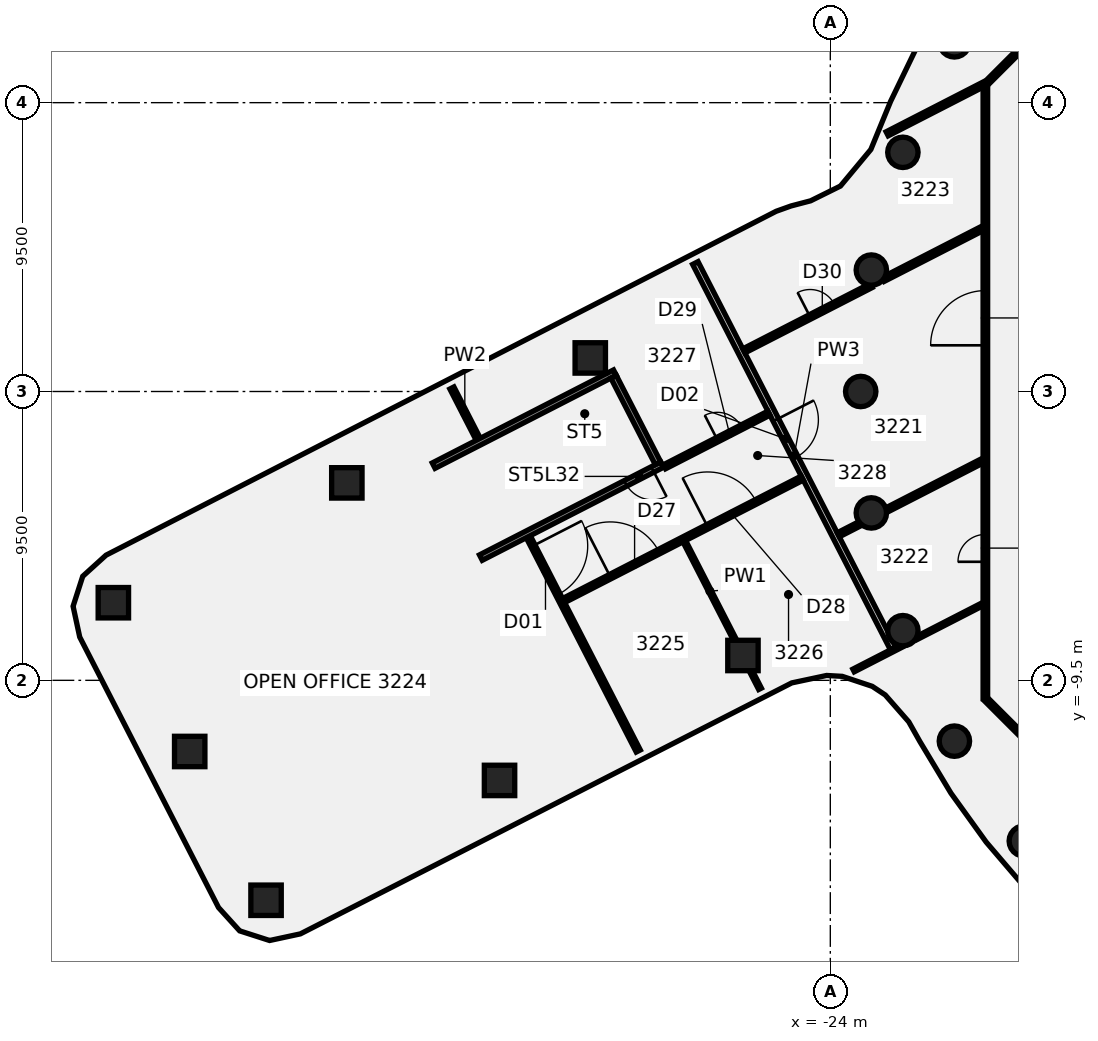
"""IFC4 building model, lengths in metres.
Left out: names, types, materials, properties, quantities, classifications, styles, units other than length and angle.
Written with IfcOpenShell. Run it as: python <this file> out.ifc"""

import sys

from ifc_helpers import new_model, si_unit, direction, frame, frame_2d, origin, origin_2d, place, context, subcontext, project, spatial, polyline, rectangle, circle, outline, extrude, element, fill, save


model = new_model("IFC4")
c1 = context("Model", 3, precision=1e-05, world=origin(), true_north=direction((0.0, 1.0)))
c2 = subcontext(c1, "Body", "Model", "MODEL_VIEW")
j1 = project(units=[si_unit("LENGTHUNIT", "METRE"), si_unit("PLANEANGLEUNIT", "RADIAN")], contexts=[c1])
p1 = place(None, origin())
s1 = spatial("IfcSite", under=j1, at=p1, CompositionType="ELEMENT")
p2 = place(p1, origin())
s2 = spatial("IfcBuilding", under=s1, at=p2, CompositionType="ELEMENT")
p3 = place(p2, frame((0.0, 0.0, 133.0)))
s3 = spatial("IfcBuildingStorey", under=s2, at=p3, CompositionType="ELEMENT", Elevation=133.0)
for number, where, z_axis, x_axis in (
    (1, (-19.919, 11.5, -0.14), (0.0, 0.0, 1.0), (1.0, 0.0, 0.0)),
    (2, (-21.613, 7.866, -0.14), (0.0, 0.0, 1.0), (1.0, 0.0, 0.0)),
    (3, (-22.651, 3.994, -0.14), (0.0, 0.0, 1.0), (1.0, 0.0, 0.0)),
    (4, (-23.0, 0.0, -0.14), (0.0, 0.0, 1.0), (1.0, 0.0, 0.0)),
    (5, (-22.651, -3.994, -0.14), (0.0, 0.0, 1.0), (1.0, 0.0, 0.0)),
    (6, (-21.613, -7.866, -0.14), (0.0, 0.0, 1.0), (1.0, 0.0, 0.0)),
    (7, (-19.919, -11.5, -0.14), (0.0, 0.0, 1.0), (1.0, 0.0, 0.0)),
    (8, (-17.619, -14.784, -0.14), (0.0, 0.0, 1.0), (1.0, 0.0, 0.0)),
):
    element("IfcColumn", number, at=place(p3, frame(where, z_axis=z_axis, x_axis=x_axis)), inside=s3, PredefinedType="COLUMN", context=c2, shape_type="SweptSolid", body=[
        extrude(circle(Radius=0.5, at=origin_2d()), origin(), (0.0, 0.0, 1.0), 3.75),
    ])
p4 = place(p3, frame((-34.88, -12.792, -0.134), z_axis=(0.062521773916, -0.061871859426, 0.996123938472), x_axis=(-0.453556116001, 0.887299968667, 0.083579993069)))
e9 = element("IfcColumn", 9, at=p4, inside=s3, PredefinedType="COLUMN", context=c2, shape_type="SweptSolid", body=[
    extrude(rectangle(XDim=1.0, YDim=1.0, at=origin_2d()), origin(), (0.0, 0.0, 1.0), 3.757),
])
p5 = place(p3, frame((-39.903, -3.006, -0.134), z_axis=(0.015336055459, -0.086557736741, 0.996128788668), x_axis=(0.889923738813, 0.455375187571, 0.025868468099)))
e10 = element("IfcColumn", 10, at=p5, inside=s3, PredefinedType="COLUMN", context=c2, shape_type="SweptSolid", body=[
    extrude(rectangle(XDim=1.0, YDim=1.0, at=origin_2d()), origin(), (0.0, 0.0, 1.0), 3.757),
])
p6 = place(p3, frame((-26.873, -8.683, -0.136), z_axis=(0.042396721911, -0.023249815242, 0.99883029793), x_axis=(-0.45636204272, 0.888891864763, 0.040061686479)))
e11 = element("IfcColumn", 11, at=p6, inside=s3, PredefinedType="COLUMN", context=c2, shape_type="SweptSolid", body=[
    extrude(rectangle(XDim=1.0, YDim=1.0, at=origin_2d()), origin(), (0.0, 0.0, 1.0), 3.749),
])
p7 = place(p3, frame((-31.896, 1.104, -0.136), z_axis=(-0.004949211766, -0.048124572307, 0.998829079895), x_axis=(0.889858610868, 0.455474581289, 0.026354477116)))
e12 = element("IfcColumn", 12, at=p7, inside=s3, PredefinedType="COLUMN", context=c2, shape_type="SweptSolid", body=[
    extrude(rectangle(XDim=1.0, YDim=1.0, at=origin_2d()), origin(), (0.0, 0.0, 1.0), 3.749),
])
p8 = place(p3, frame((-47.583, -6.947, -0.131), z_axis=(0.021573490305, -0.130025765362, 0.991275887358), x_axis=(0.890036848371, 0.454113091891, 0.04019587435)))
e13 = element("IfcColumn", 13, at=p8, inside=s3, PredefinedType="COLUMN", context=c2, shape_type="SweptSolid", body=[
    extrude(rectangle(XDim=1.0, YDim=1.0, at=origin_2d()), origin(), (0.0, 0.0, 1.0), 3.757),
])
p9 = place(p3, frame((-45.071, -11.84, -0.133), z_axis=(0.045053158792, -0.117801332946, 0.992014646484), x_axis=(0.890031586101, 0.455693217506, 0.013691868468)))
e14 = element("IfcColumn", 14, at=p9, inside=s3, PredefinedType="COLUMN", context=c2, shape_type="SweptSolid", body=[
    extrude(rectangle(XDim=1.0, YDim=1.0, at=origin_2d()), origin(), (0.0, 0.0, 1.0), 3.755),
])
p10 = place(p3, frame((-42.56, -16.733, -0.132), z_axis=(0.068538826824, -0.105474361583, 0.992057250498), x_axis=(-0.452121084233, 0.883135905889, 0.125129920171)))
e15 = element("IfcColumn", 15, at=p10, inside=s3, PredefinedType="COLUMN", context=c2, shape_type="SweptSolid", body=[
    extrude(rectangle(XDim=1.0, YDim=1.0, at=origin_2d()), origin(), (0.0, 0.0, 1.0), 3.754),
])
p11 = place(p3, frame((-36.447, 0.116, 0.0), z_axis=(0.0, 0.0, 1.0), x_axis=(0.456697932763, -0.889621828762, 0.0)))
e16 = element("IfcWall", 16, at=p11, inside=s3, PredefinedType="PARTITIONING", context=c2, shape_type="SweptSolid", body=[
    extrude(rectangle(XDim=1.859, YDim=0.15, at=frame_2d((0.929, 0.0))), origin(), (0.0, 0.0, 1.0), 3.01),
])
p12 = place(p3, frame((-33.917, -4.812, 0.0), z_axis=(0.0, 0.0, 1.0), x_axis=(0.456714601122, -0.889613271665, 0.0)))
e17 = element("IfcWall", 17, at=p12, inside=s3, PredefinedType="PARTITIONING", context=c2, shape_type="SweptSolid", body=[
    extrude(rectangle(XDim=7.883, YDim=0.15, at=frame_2d((3.941, 0.0))), origin(), (0.0, 0.0, 1.0), 3.01),
])
p13 = place(p12, frame((0.3, 0.0, 0.0)))
e18 = element("IfcOpeningElement", 18, at=p13, cuts=e17, PredefinedType="OPENING", context=c2, shape_type="SweptSolid", body=[
    extrude(rectangle(XDim=1.8, YDim=2.1, at=frame_2d((0.9, 1.05))), frame((0.0, 0.085, 0.0), z_axis=(0.0, -1.0, 0.0), x_axis=(1.0, 0.0, 0.0)), (0.0, 0.0, 1.0), 0.17),
])
p14 = place(p3, frame((-28.803, -4.924, 0.0), z_axis=(0.0, 0.0, 1.0), x_axis=(0.456510977647, -0.889717779573, 0.0)))
e19 = element("IfcWall", 19, at=p14, inside=s3, PredefinedType="PARTITIONING", context=c2, shape_type="SweptSolid", body=[
    extrude(rectangle(XDim=3.698, YDim=0.1, at=frame_2d((1.849, 0.0))), origin(), (0.0, 0.0, 1.0), 3.01),
])
p15 = place(p3, frame((-26.57, -9.276, 0.0), z_axis=(0.0, 0.0, 1.0), x_axis=(0.456869393686, -0.889533786381, 0.0)))
e20 = element("IfcWall", 20, at=p15, inside=s3, PredefinedType="PARTITIONING", context=c2, shape_type="SweptSolid", body=[
    extrude(rectangle(XDim=0.565, YDim=0.1, at=frame_2d((0.282, 0.0))), origin(), (0.0, 0.0, 1.0), 3.01),
])
p16 = place(p3, frame((-28.439, 4.225, 0.0), z_axis=(0.0, 0.0, 1.0), x_axis=(0.456564117727, -0.889690511585, 0.0)))
e21 = element("IfcWall", 21, at=p16, inside=s3, PredefinedType="PARTITIONING", context=c2, shape_type="SweptSolid", body=[
    extrude(rectangle(XDim=14.24, YDim=0.2, at=frame_2d((7.12, 0.0))), origin(), (0.0, 0.0, 1.0), 3.01),
])
p17 = place(p16, frame((5.799, 0.0, 0.0)))
e22 = element("IfcOpeningElement", 22, at=p17, cuts=e21, PredefinedType="OPENING", context=c2, shape_type="SweptSolid", body=[
    extrude(rectangle(XDim=1.4, YDim=2.1, at=frame_2d((0.7, 1.05))), frame((0.0, 0.11, 0.0), z_axis=(0.0, -1.0, 0.0), x_axis=(1.0, 0.0, 0.0)), (0.0, 0.0, 1.0), 0.22),
])
p18 = place(p3, frame((-18.872, -10.128, 0.0), z_axis=(0.0, 0.0, 1.0), x_axis=(0.707106781187, -0.707106781187, 0.0)))
e23 = element("IfcWall", 23, at=p18, inside=s3, PredefinedType="PARTITIONING", context=c2, shape_type="SweptSolid", body=[
    extrude(rectangle(XDim=2.465, YDim=0.15, at=frame_2d((1.232, 0.0))), origin(), (0.0, 0.0, 1.0), 3.01),
])
p19 = place(p3, frame((-32.769, -6.875, 0.0), z_axis=(0.0, 0.0, 1.0), x_axis=(0.889705612148, 0.45653469059, 0.0)))
e24 = element("IfcWall", 24, at=p19, inside=s3, PredefinedType="PARTITIONING", context=c2, shape_type="SweptSolid", body=[
    extrude(rectangle(XDim=8.819, YDim=0.15, at=frame_2d((4.41, 0.0))), origin(), (0.0, 0.0, 1.0), 3.01),
])
p20 = place(p19, frame((1.72, 0.0, 0.0)))
e25 = element("IfcOpeningElement", 25, at=p20, cuts=e24, PredefinedType="OPENING", context=c2, shape_type="SweptSolid", body=[
    extrude(rectangle(XDim=1.8, YDim=2.1, at=frame_2d((0.9, 1.05))), frame((0.0, 0.085, 0.0), z_axis=(0.0, -1.0, 0.0), x_axis=(1.0, 0.0, 0.0)), (0.0, 0.0, 1.0), 0.17),
])
p21 = place(p19, frame((5.319, 0.0, 0.0)))
e26 = element("IfcOpeningElement", 26, at=p21, cuts=e24, PredefinedType="OPENING", context=c2, shape_type="SweptSolid", body=[
    extrude(rectangle(XDim=1.8, YDim=2.1, at=frame_2d((0.9, 1.05))), frame((0.0, 0.085, 0.0), z_axis=(0.0, -1.0, 0.0), x_axis=(1.0, 0.0, 0.0)), (0.0, 0.0, 1.0), 0.17),
])
p22 = place(p3, frame((-29.452, -2.475, 0.0), z_axis=(0.0, 0.0, 1.0), x_axis=(0.889671887014, 0.456600408954, 0.0)))
e27 = element("IfcWall", 27, at=p22, inside=s3, PredefinedType="PARTITIONING", context=c2, shape_type="SweptSolid", body=[
    extrude(rectangle(XDim=3.86, YDim=0.15, at=frame_2d((1.93, 0.0))), origin(), (0.0, 0.0, 1.0), 3.01),
])
p23 = place(p22, frame((1.95, 0.0, 0.0)))
e28 = element("IfcOpeningElement", 28, at=p23, cuts=e27, PredefinedType="OPENING", context=c2, shape_type="SweptSolid", body=[
    extrude(rectangle(XDim=0.9, YDim=2.1, at=frame_2d((0.45, 1.05))), frame((0.0, 0.085, 0.0), z_axis=(0.0, -1.0, 0.0), x_axis=(1.0, 0.0, 0.0)), (0.0, 0.0, 1.0), 0.17),
])
p24 = place(p3, frame((-26.844, 1.336, 0.0), z_axis=(0.0, 0.0, 1.0), x_axis=(0.889711625335, 0.456522971759, 0.0)))
e29 = element("IfcWall", 29, at=p24, inside=s3, PredefinedType="PARTITIONING", context=c2, shape_type="SweptSolid", body=[
    extrude(rectangle(XDim=4.708, YDim=0.15, at=frame_2d((2.354, 0.0))), origin(), (0.0, 0.0, 1.0), 3.01),
])
p25 = place(p24, frame((2.45, 0.0, 0.0)))
e30 = element("IfcOpeningElement", 30, at=p25, cuts=e29, PredefinedType="OPENING", context=c2, shape_type="SweptSolid", body=[
    extrude(rectangle(XDim=0.9, YDim=2.1, at=frame_2d((0.45, 1.05))), frame((0.0, 0.085, 0.0), z_axis=(0.0, -1.0, 0.0), x_axis=(1.0, 0.0, 0.0)), (0.0, 0.0, 1.0), 0.17),
])
p26 = place(p3, frame((-22.26, 3.688, 0.0), z_axis=(0.0, 0.0, 1.0), x_axis=(0.889723982038, 0.45649888914, 0.0)))
e31 = element("IfcWall", 31, at=p26, inside=s3, PredefinedType="PARTITIONING", context=c2, shape_type="SweptSolid", body=[
    extrude(rectangle(XDim=3.671, YDim=0.15, at=frame_2d((1.836, 0.0))), origin(), (0.0, 0.0, 1.0), 3.01),
])
p27 = place(p3, frame((-23.736, -4.712, 0.0), z_axis=(0.0, 0.0, 1.0), x_axis=(0.889684437698, 0.456575953503, 0.0)))
e32 = element("IfcWall", 32, at=p27, inside=s3, PredefinedType="PARTITIONING", context=c2, shape_type="SweptSolid", body=[
    extrude(rectangle(XDim=0.822, YDim=0.15, at=frame_2d((0.411, 0.0))), origin(), (0.0, 0.0, 1.0), 3.01),
])
p28 = place(p3, frame((-22.164, -3.906, 0.0), z_axis=(0.0, 0.0, 1.0), x_axis=(0.889720446933, 0.456505779054, 0.0)))
e33 = element("IfcWall", 33, at=p28, inside=s3, PredefinedType="PARTITIONING", context=c2, shape_type="SweptSolid", body=[
    extrude(rectangle(XDim=3.564, YDim=0.15, at=frame_2d((1.782, 0.0))), origin(), (0.0, 0.0, 1.0), 3.01),
])
p29 = place(p3, frame((-23.235, -9.176, 0.0), z_axis=(0.0, 0.0, 1.0), x_axis=(0.889731557273, 0.456484124578, 0.0)))
e34 = element("IfcWall", 34, at=p29, inside=s3, PredefinedType="PARTITIONING", context=c2, shape_type="SweptSolid", body=[
    extrude(rectangle(XDim=1.776, YDim=0.1, at=frame_2d((0.888, 0.0))), origin(), (0.0, 0.0, 1.0), 3.01),
])
p30 = place(p3, frame((-21.17, -8.116, 0.0), z_axis=(0.0, 0.0, 1.0), x_axis=(0.889716227949, 0.456514001675, 0.0)))
e35 = element("IfcWall", 35, at=p30, inside=s3, PredefinedType="PARTITIONING", context=c2, shape_type="SweptSolid", body=[
    extrude(rectangle(XDim=2.461, YDim=0.1, at=frame_2d((1.23, 0.0))), origin(), (0.0, 0.0, 1.0), 3.01),
])
p31 = place(p3, frame((-22.13, 8.476, 0.0), z_axis=(0.0, 0.0, 1.0), x_axis=(0.889666890189, 0.456610144984, 0.0)))
e36 = element("IfcWall", 36, at=p31, inside=s3, PredefinedType="PARTITIONING", context=c2, shape_type="SweptSolid", body=[
    extrude(rectangle(XDim=3.597, YDim=0.15, at=frame_2d((1.798, 0.0))), origin(), (0.0, 0.0, 1.0), 3.01),
])
p32 = place(p3, frame((-18.872, 10.128, 0.0), z_axis=(0.0, 0.0, 1.0), x_axis=(0.707106781187, 0.707106781187, 0.0)))
e37 = element("IfcWall", 37, at=p32, inside=s3, PredefinedType="PARTITIONING", context=c2, shape_type="SweptSolid", body=[
    extrude(rectangle(XDim=2.505, YDim=0.15, at=frame_2d((1.253, 0.0))), origin(), (0.0, 0.0, 1.0), 3.01),
])
p33 = place(p3, frame((-18.9, -10.1, 0.0), z_axis=(0.0, 0.0, 1.0), x_axis=(0.0, 1.0, 0.0)))
e38 = element("IfcWall", 38, at=p33, inside=s3, PredefinedType="PARTITIONING", context=c2, shape_type="SweptSolid", body=[
    extrude(rectangle(XDim=20.2, YDim=0.15, at=frame_2d((10.1, 0.0))), origin(), (0.0, 0.0, 1.0), 3.01),
])
p34 = place(p33, frame((11.619, 0.0, 0.0)))
e39 = element("IfcOpeningElement", 39, at=p34, cuts=e38, PredefinedType="OPENING", context=c2, shape_type="SweptSolid", body=[
    extrude(rectangle(XDim=1.8, YDim=2.1, at=frame_2d((0.9, 1.05))), frame((0.0, 0.085, 0.0), z_axis=(0.0, -1.0, 0.0), x_axis=(1.0, 0.0, 0.0)), (0.0, 0.0, 1.0), 0.17),
])
p35 = place(p33, frame((4.499, 0.0, 0.0)))
e40 = element("IfcOpeningElement", 40, at=p35, cuts=e38, PredefinedType="OPENING", context=c2, shape_type="SweptSolid", body=[
    extrude(rectangle(XDim=0.9, YDim=2.1, at=frame_2d((0.45, 1.05))), frame((0.0, 0.085, 0.0), z_axis=(0.0, -1.0, 0.0), x_axis=(1.0, 0.0, 0.0)), (0.0, 0.0, 1.0), 0.17),
])
p36 = place(p3, frame((-29.533, -2.405, -0.14), z_axis=(0.0, 0.0, 1.0), x_axis=(-0.889699446703, -0.456546705756, 0.0)))
e41 = element("IfcWall", 41, at=p36, inside=s3, PredefinedType="SHEAR", context=c2, shape_type="SweptSolid", body=[
    extrude(rectangle(XDim=6.7, YDim=0.2, at=frame_2d((3.35, 0.0))), origin(), (0.0, 0.0, 1.0), 3.15),
])
p37 = place(p36, frame((0.35, 0.0, 0.0)))
e42 = element("IfcOpeningElement", 42, at=p37, cuts=e41, PredefinedType="OPENING", context=c2, shape_type="SweptSolid", body=[
    extrude(rectangle(XDim=1.0, YDim=2.1, at=frame_2d((0.5, 1.05))), frame((0.0, 0.11, 0.0), z_axis=(0.0, -1.0, 0.0), x_axis=(1.0, 0.0, 0.0)), (0.0, 0.0, 1.0), 0.22),
])
p38 = place(p3, frame((-31.085, 0.621, -0.14), z_axis=(0.0, 0.0, 1.0), x_axis=(-0.889684645268, -0.456575549033, 0.0)))
e43 = element("IfcWall", 43, at=p38, inside=s3, PredefinedType="SHEAR", context=c2, shape_type="SweptSolid", body=[
    extrude(rectangle(XDim=6.7, YDim=0.2, at=frame_2d((3.35, 0.0))), origin(), (0.0, 0.0, 1.0), 3.15),
])
p39 = place(p3, frame((-31.129, 0.486, -0.14), z_axis=(0.0, 0.0, 1.0), x_axis=(0.456558269459, -0.889693512727, 0.0)))
e44 = element("IfcWall", 44, at=p39, inside=s3, PredefinedType="SHEAR", context=c2, shape_type="SweptSolid", body=[
    extrude(rectangle(XDim=3.2, YDim=0.2, at=frame_2d((1.6, 0.0))), origin(), (0.0, 0.0, 1.0), 3.15),
])
p40 = place(p3, frame((0.0, 0.0, -0.14)))
e45 = element("IfcWall", 45, at=p40, inside=s3, PredefinedType="SHEAR", context=c2, shape_type="SweptSolid", body=[
    extrude(outline(polyline([(-36.823, -2.436), (-37.001, -2.527), (-35.54, -5.375), (-35.362, -5.283), (-36.823, -2.436)])), origin(), (0.0, 0.0, 1.0), 3.15),
])
p41 = place(p13, frame((1.8, 0.0, 0.0), z_axis=(0.0, 0.0, 1.0), x_axis=(-1.0, 0.0, 0.0)))
e46 = element("IfcDoor", 46, at=p41, inside=s3, OperationType="DOUBLE_DOOR_SINGLE_SWING", PredefinedType="DOOR", context=c2, shape_type="SweptSolid", body=[
    extrude(rectangle(XDim=1.8, YDim=2.1, at=frame_2d((0.9, 1.05))), frame((0.0, 0.025, 0.0), z_axis=(0.0, -1.0, 0.0), x_axis=(1.0, 0.0, 0.0)), (0.0, 0.0, 1.0), 0.05),
])
fill(e18, e46)
p42 = place(p17, origin())
e47 = element("IfcDoor", 47, at=p42, inside=s3, OperationType="DOUBLE_DOOR_SINGLE_SWING", PredefinedType="DOOR", context=c2, shape_type="SweptSolid", body=[
    extrude(rectangle(XDim=1.4, YDim=2.1, at=frame_2d((0.7, 1.05))), frame((0.0, 0.025, 0.0), z_axis=(0.0, -1.0, 0.0), x_axis=(1.0, 0.0, 0.0)), (0.0, 0.0, 1.0), 0.05),
])
fill(e22, e47)
p43 = place(p20, frame((1.8, 0.0, 0.0), z_axis=(0.0, 0.0, 1.0), x_axis=(-1.0, 0.0, 0.0)))
e48 = element("IfcDoor", 48, at=p43, inside=s3, OperationType="DOUBLE_DOOR_SINGLE_SWING", PredefinedType="DOOR", context=c2, shape_type="SweptSolid", body=[
    extrude(rectangle(XDim=1.8, YDim=2.1, at=frame_2d((0.9, 1.05))), frame((0.0, 0.025, 0.0), z_axis=(0.0, -1.0, 0.0), x_axis=(1.0, 0.0, 0.0)), (0.0, 0.0, 1.0), 0.05),
])
fill(e25, e48)
p44 = place(p21, frame((1.8, 0.0, 0.0), z_axis=(0.0, 0.0, 1.0), x_axis=(-1.0, 0.0, 0.0)))
e49 = element("IfcDoor", 49, at=p44, inside=s3, OperationType="DOUBLE_DOOR_SINGLE_SWING", PredefinedType="DOOR", context=c2, shape_type="SweptSolid", body=[
    extrude(rectangle(XDim=1.8, YDim=2.1, at=frame_2d((0.9, 1.05))), frame((0.0, 0.025, 0.0), z_axis=(0.0, -1.0, 0.0), x_axis=(1.0, 0.0, 0.0)), (0.0, 0.0, 1.0), 0.05),
])
fill(e26, e49)
p45 = place(p23, origin())
e50 = element("IfcDoor", 50, at=p45, inside=s3, OperationType="SINGLE_SWING_LEFT", PredefinedType="DOOR", context=c2, shape_type="SweptSolid", body=[
    extrude(rectangle(XDim=0.9, YDim=2.1, at=frame_2d((0.45, 1.05))), frame((0.0, 0.025, 0.0), z_axis=(0.0, -1.0, 0.0), x_axis=(1.0, 0.0, 0.0)), (0.0, 0.0, 1.0), 0.05),
])
fill(e28, e50)
p46 = place(p25, origin())
e51 = element("IfcDoor", 51, at=p46, inside=s3, OperationType="SINGLE_SWING_LEFT", PredefinedType="DOOR", context=c2, shape_type="SweptSolid", body=[
    extrude(rectangle(XDim=0.9, YDim=2.1, at=frame_2d((0.45, 1.05))), frame((0.0, 0.025, 0.0), z_axis=(0.0, -1.0, 0.0), x_axis=(1.0, 0.0, 0.0)), (0.0, 0.0, 1.0), 0.05),
])
fill(e30, e51)
p47 = place(p34, frame((1.8, 0.0, 0.0), z_axis=(0.0, 0.0, 1.0), x_axis=(-1.0, 0.0, 0.0)))
e52 = element("IfcDoor", 52, at=p47, inside=s3, OperationType="DOUBLE_DOOR_SINGLE_SWING", PredefinedType="DOOR", context=c2, shape_type="SweptSolid", body=[
    extrude(rectangle(XDim=1.8, YDim=2.1, at=frame_2d((0.9, 1.05))), frame((0.0, 0.025, 0.0), z_axis=(0.0, -1.0, 0.0), x_axis=(1.0, 0.0, 0.0)), (0.0, 0.0, 1.0), 0.05),
])
fill(e39, e52)
p48 = place(p35, origin())
e53 = element("IfcDoor", 53, at=p48, inside=s3, OperationType="SINGLE_SWING_RIGHT", PredefinedType="DOOR", context=c2, shape_type="SweptSolid", body=[
    extrude(rectangle(XDim=0.9, YDim=2.1, at=frame_2d((0.45, 1.05))), frame((0.0, 0.025, 0.0), z_axis=(0.0, -1.0, 0.0), x_axis=(1.0, 0.0, 0.0)), (0.0, 0.0, 1.0), 0.05),
])
fill(e40, e53)
p49 = place(p37, origin())
e54 = element("IfcDoor", 54, at=p49, inside=s3, OperationType="SINGLE_SWING_LEFT", PredefinedType="DOOR", context=c2, shape_type="SweptSolid", body=[
    extrude(rectangle(XDim=1.0, YDim=2.1, at=frame_2d((0.5, 1.05))), frame((0.0, 0.025, 0.0), z_axis=(0.0, -1.0, 0.0), x_axis=(1.0, 0.0, 0.0)), (0.0, 0.0, 1.0), 0.05),
])
fill(e42, e54)
save(model, sys.argv[1])
